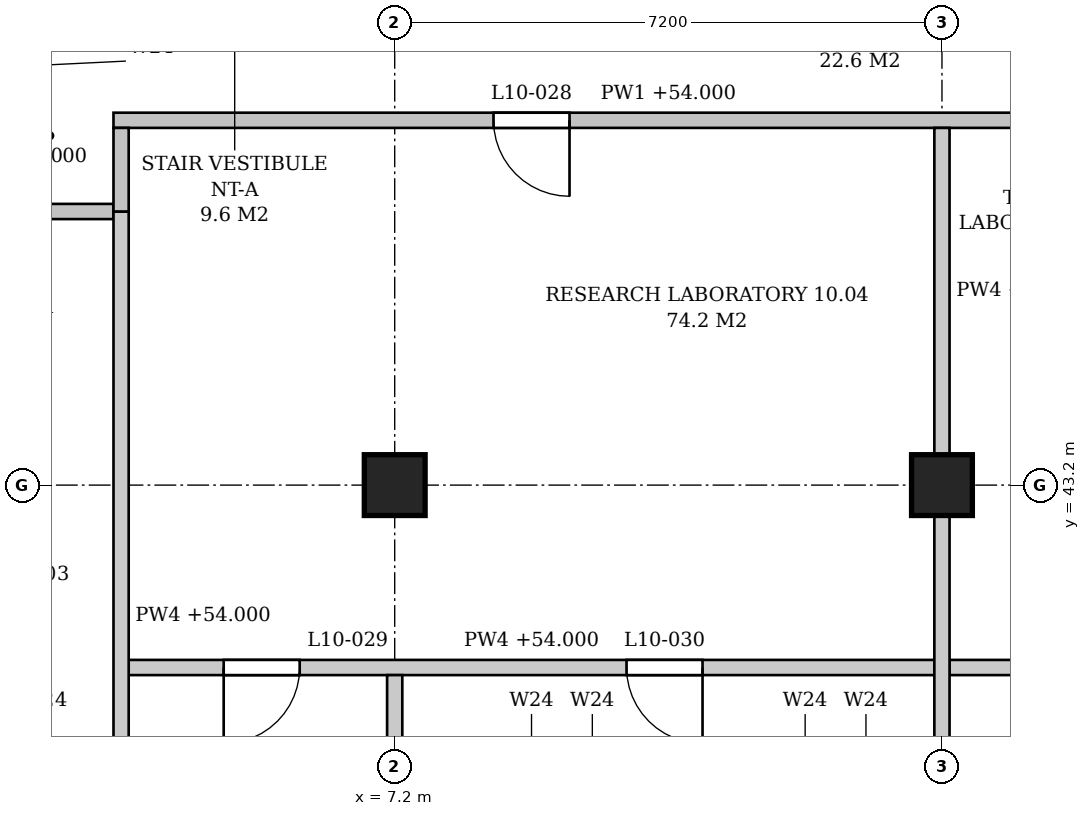
"""IFC4 building model, lengths in metres.
Left out: names, types, materials, properties, quantities, classifications, styles, units other than length and angle.
Written with IfcOpenShell. Run it as: python <this file> out.ifc"""

import sys

from ifc_helpers import new_model, si_unit, direction, frame, frame_2d, origin, origin_2d, place, context, subcontext, project, spatial, polyline, rectangle, outline, extrude, element, fill, save


model = new_model("IFC4")
c1 = context("Model", 3, precision=1e-05, world=origin(), true_north=direction((0.0, 1.0)))
c2 = subcontext(c1, "Body", "Model", "MODEL_VIEW")
j1 = project(units=[si_unit("LENGTHUNIT", "METRE"), si_unit("PLANEANGLEUNIT", "RADIAN")], contexts=[c1])
p1 = place(None, origin())
s1 = spatial("IfcSite", under=j1, at=p1, CompositionType="ELEMENT")
p2 = place(p1, origin())
s2 = spatial("IfcBuilding", under=s1, at=p2, CompositionType="ELEMENT")
p3 = place(p2, frame((0.0, 0.0, 49.8)))
s3 = spatial("IfcBuildingStorey", under=s2, at=p3, CompositionType="ELEMENT", Elevation=49.8)
for number, where, z_axis, x_axis in (
    (1, (7.2, 43.2, 0.0), (0.0, 0.0, 1.0), (1.0, 0.0, 0.0)),
    (2, (14.4, 43.2, 0.0), (0.0, 0.0, 1.0), (1.0, 0.0, 0.0)),
):
    element("IfcColumn", number, at=place(p3, frame(where, z_axis=z_axis, x_axis=x_axis)), inside=s3, PredefinedType="COLUMN", context=c2, shape_type="SweptSolid", body=[
        extrude(rectangle(XDim=0.8, YDim=0.8, at=origin_2d()), origin(), (0.0, 0.0, 1.0), 4.5),
    ])
p4 = place(p3, frame((3.7, 40.8, 0.0), z_axis=(0.0, 0.0, 1.0), x_axis=(1.0, 0.0, 0.0)))
e3 = element("IfcWall", 3, at=p4, inside=s3, PredefinedType="PARTITIONING", context=c2, shape_type="SweptSolid", body=[
    extrude(outline(polyline([(0.0, 0.0), (10.6, 0.0), (10.6, 3.55), (10.475, 3.55), (10.475, 4.2), (3.725, 4.2), (3.725, 3.55), (3.275, 3.55), (3.275, 4.2), (0.0, 4.2), (0.0, 0.0)])), frame((0.0, 0.1, 0.0), z_axis=(0.0, -1.0, 0.0), x_axis=(1.0, 0.0, 0.0)), (0.0, 0.0, 1.0), 0.2),
])
p5 = place(p4, frame((1.25, 0.0, 0.0)))
e4 = element("IfcOpeningElement", 4, at=p5, cuts=e3, PredefinedType="OPENING", context=c2, shape_type="SweptSolid", body=[
    extrude(rectangle(XDim=1.0, YDim=2.1, at=frame_2d((0.5, 1.05))), frame((0.0, 0.11, 0.0), z_axis=(0.0, -1.0, 0.0), x_axis=(1.0, 0.0, 0.0)), (0.0, 0.0, 1.0), 0.22),
])
p6 = place(p4, frame((6.55, 0.0, 0.0)))
e5 = element("IfcOpeningElement", 5, at=p6, cuts=e3, PredefinedType="OPENING", context=c2, shape_type="SweptSolid", body=[
    extrude(rectangle(XDim=1.0, YDim=2.1, at=frame_2d((0.5, 1.05))), frame((0.0, 0.11, 0.0), z_axis=(0.0, -1.0, 0.0), x_axis=(1.0, 0.0, 0.0)), (0.0, 0.0, 1.0), 0.22),
])
p7 = place(p3, frame((14.5, 40.8, 0.0), z_axis=(0.0, 0.0, 1.0), x_axis=(1.0, 0.0, 0.0)))
e6 = element("IfcWall", 6, at=p7, inside=s3, PredefinedType="PARTITIONING", context=c2, shape_type="SweptSolid", body=[
    extrude(outline(polyline([(0.0, 0.0), (3.4, 0.0), (3.4, 4.2), (0.125, 4.2), (0.125, 3.55), (0.0, 3.55), (0.0, 0.0)])), frame((0.0, 0.1, 0.0), z_axis=(0.0, -1.0, 0.0), x_axis=(1.0, 0.0, 0.0)), (0.0, 0.0, 1.0), 0.2),
])
p8 = place(p7, frame((1.2, 0.0, 0.0)))
e7 = element("IfcOpeningElement", 7, at=p8, cuts=e6, PredefinedType="OPENING", context=c2, shape_type="SweptSolid", body=[
    extrude(rectangle(XDim=1.0, YDim=2.1, at=frame_2d((0.5, 1.05))), frame((0.0, 0.11, 0.0), z_axis=(0.0, -1.0, 0.0), x_axis=(1.0, 0.0, 0.0)), (0.0, 0.0, 1.0), 0.22),
])
p9 = place(p3, frame((0.15, 46.8, 0.0), z_axis=(0.0, 0.0, 1.0), x_axis=(1.0, 0.0, 0.0)))
e8 = element("IfcWall", 8, at=p9, inside=s3, PredefinedType="PARTITIONING", context=c2, shape_type="SweptSolid", body=[
    extrude(outline(polyline([(0.0, 0.0), (3.35, 0.0), (3.35, 4.2), (0.05, 4.2), (0.05, 3.6), (0.0, 3.6), (0.0, 0.0)])), frame((0.0, 0.1, 0.0), z_axis=(0.0, -1.0, 0.0), x_axis=(1.0, 0.0, 0.0)), (0.0, 0.0, 1.0), 0.2),
])
p10 = place(p9, frame((1.175, 0.0, 0.0)))
e9 = element("IfcOpeningElement", 9, at=p10, cuts=e8, PredefinedType="OPENING", context=c2, shape_type="SweptSolid", body=[
    extrude(rectangle(XDim=1.0, YDim=2.1, at=frame_2d((0.5, 1.05))), frame((0.0, 0.11, 0.0), z_axis=(0.0, -1.0, 0.0), x_axis=(1.0, 0.0, 0.0)), (0.0, 0.0, 1.0), 0.22),
])
p11 = place(p3, frame((3.5, 48.0, 0.0), z_axis=(0.0, 0.0, 1.0), x_axis=(1.0, 0.0, 0.0)))
e10 = element("IfcWall", 10, at=p11, inside=s3, PredefinedType="PARTITIONING", context=c2, shape_type="SweptSolid", body=[
    extrude(outline(polyline([(0.0, 0.0), (14.6, 0.0), (14.6, 4.2), (11.125, 4.2), (11.125, 3.55), (10.675, 3.55), (10.675, 4.2), (3.925, 4.2), (3.925, 3.55), (3.475, 3.55), (3.475, 4.2), (0.0, 4.2), (0.0, 0.0)])), frame((0.0, 0.1, 0.0), z_axis=(0.0, -1.0, 0.0), x_axis=(1.0, 0.0, 0.0)), (0.0, 0.0, 1.0), 0.2),
])
p12 = place(p11, frame((5.0, 0.0, 0.0)))
e11 = element("IfcOpeningElement", 11, at=p12, cuts=e10, PredefinedType="OPENING", context=c2, shape_type="SweptSolid", body=[
    extrude(rectangle(XDim=1.0, YDim=2.1, at=frame_2d((0.5, 1.05))), frame((0.0, 0.11, 0.0), z_axis=(0.0, -1.0, 0.0), x_axis=(1.0, 0.0, 0.0)), (0.0, 0.0, 1.0), 0.22),
])
p13 = place(p3, frame((3.6, 36.15, 0.0), z_axis=(0.0, 0.0, 1.0), x_axis=(0.0, 1.0, 0.0)))
e12 = element("IfcWall", 12, at=p13, inside=s3, PredefinedType="PARTITIONING", context=c2, shape_type="SweptSolid", body=[
    extrude(outline(polyline([(0.0, 0.0), (10.65, 0.0), (10.65, 4.2), (7.275, 4.2), (7.275, 3.55), (6.825, 3.55), (6.825, 4.2), (0.05, 4.2), (0.05, 3.6), (0.0, 3.6), (0.0, 0.0)])), frame((0.0, 0.1, 0.0), z_axis=(0.0, -1.0, 0.0), x_axis=(1.0, 0.0, 0.0)), (0.0, 0.0, 1.0), 0.2),
])
p14 = place(p3, frame((3.6, 46.8, 0.0), z_axis=(0.0, 0.0, 1.0), x_axis=(0.0, 1.0, 0.0)))
e13 = element("IfcWall", 13, at=p14, inside=s3, PredefinedType="PARTITIONING", context=c2, shape_type="SweptSolid", body=[
    extrude(rectangle(XDim=1.1, YDim=0.2, at=frame_2d((0.55, 0.0))), origin(), (0.0, 0.0, 1.0), 4.2),
])
p15 = place(p3, frame((7.2, 36.4, 0.0), z_axis=(0.0, 0.0, 1.0), x_axis=(0.0, 1.0, 0.0)))
e14 = element("IfcWall", 14, at=p15, inside=s3, PredefinedType="PARTITIONING", context=c2, shape_type="SweptSolid", body=[
    extrude(rectangle(XDim=4.3, YDim=0.2, at=frame_2d((2.15, 0.0))), origin(), (0.0, 0.0, 1.0), 3.55),
])
p16 = place(p3, frame((14.4, 36.4, 0.0), z_axis=(0.0, 0.0, 1.0), x_axis=(0.0, 1.0, 0.0)))
e15 = element("IfcWall", 15, at=p16, inside=s3, PredefinedType="PARTITIONING", context=c2, shape_type="SweptSolid", body=[
    extrude(rectangle(XDim=6.4, YDim=0.2, at=frame_2d((3.2, 0.0))), origin(), (0.0, 0.0, 1.0), 3.55),
])
p17 = place(p3, frame((14.4, 43.6, 0.0), z_axis=(0.0, 0.0, 1.0), x_axis=(0.0, 1.0, 0.0)))
e16 = element("IfcWall", 16, at=p17, inside=s3, PredefinedType="PARTITIONING", context=c2, shape_type="SweptSolid", body=[
    extrude(rectangle(XDim=4.3, YDim=0.2, at=frame_2d((2.15, 0.0))), origin(), (0.0, 0.0, 1.0), 3.55),
])
p18 = place(p12, frame((1.0, 0.0, 0.0), z_axis=(0.0, 0.0, 1.0), x_axis=(-1.0, 0.0, 0.0)))
e17 = element("IfcDoor", 17, at=p18, inside=s3, OperationType="SINGLE_SWING_LEFT", PredefinedType="DOOR", context=c2, shape_type="SweptSolid", body=[
    extrude(rectangle(XDim=1.0, YDim=2.1, at=frame_2d((0.5, 1.05))), frame((0.0, 0.025, 0.0), z_axis=(0.0, -1.0, 0.0), x_axis=(1.0, 0.0, 0.0)), (0.0, 0.0, 1.0), 0.05),
])
fill(e11, e17)
p19 = place(p5, frame((1.0, 0.0, 0.0), z_axis=(0.0, 0.0, 1.0), x_axis=(-1.0, 0.0, 0.0)))
e18 = element("IfcDoor", 18, at=p19, inside=s3, OperationType="SINGLE_SWING_RIGHT", PredefinedType="DOOR", context=c2, shape_type="SweptSolid", body=[
    extrude(rectangle(XDim=1.0, YDim=2.1, at=frame_2d((0.5, 1.05))), frame((0.0, 0.025, 0.0), z_axis=(0.0, -1.0, 0.0), x_axis=(1.0, 0.0, 0.0)), (0.0, 0.0, 1.0), 0.05),
])
fill(e4, e18)
p20 = place(p6, frame((1.0, 0.0, 0.0), z_axis=(0.0, 0.0, 1.0), x_axis=(-1.0, 0.0, 0.0)))
e19 = element("IfcDoor", 19, at=p20, inside=s3, OperationType="SINGLE_SWING_LEFT", PredefinedType="DOOR", context=c2, shape_type="SweptSolid", body=[
    extrude(rectangle(XDim=1.0, YDim=2.1, at=frame_2d((0.5, 1.05))), frame((0.0, 0.025, 0.0), z_axis=(0.0, -1.0, 0.0), x_axis=(1.0, 0.0, 0.0)), (0.0, 0.0, 1.0), 0.05),
])
fill(e5, e19)
save(model, sys.argv[1])
